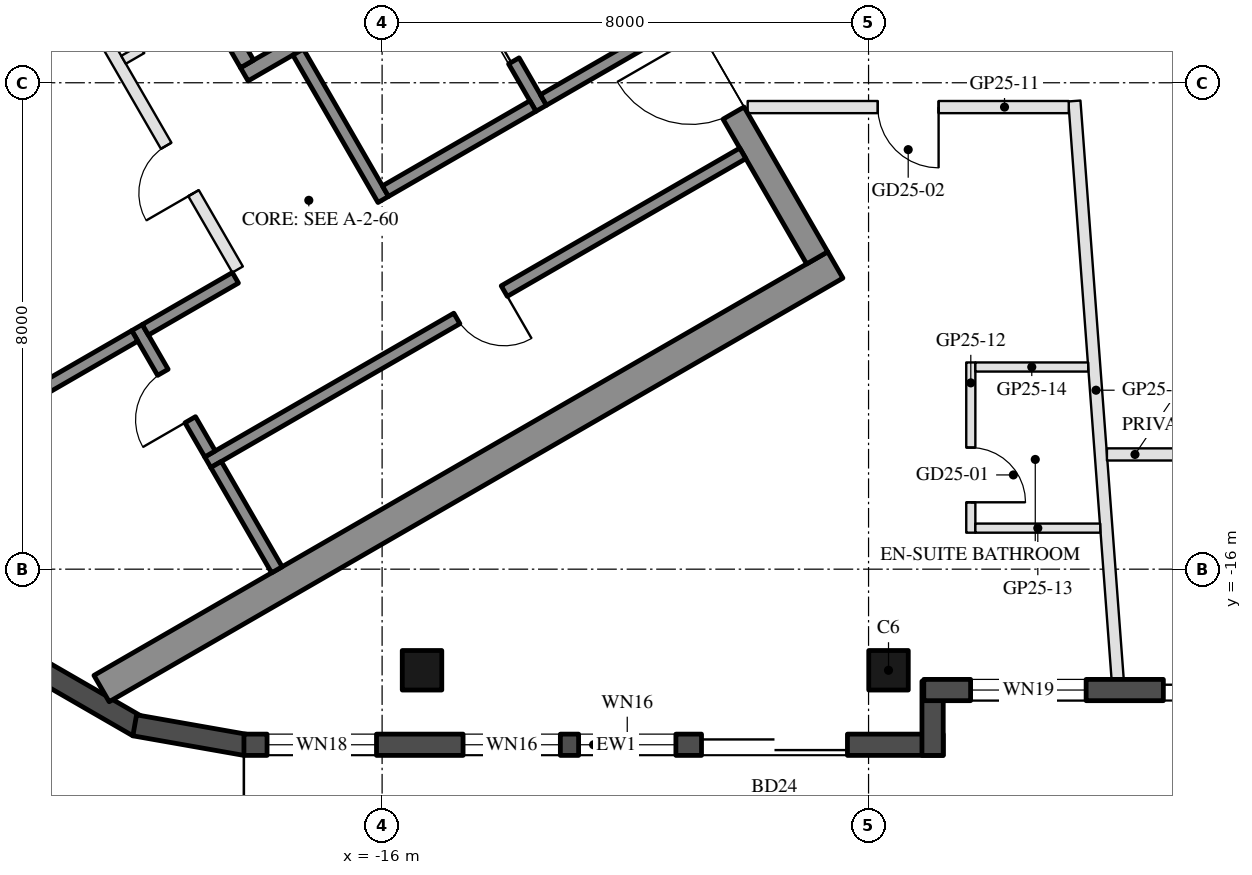
"""IFC4 building model, lengths in metres.
Left out: names, types, materials, properties, quantities, classifications, styles, units other than length and angle.
Written with IfcOpenShell. Run it as: python <this file> out.ifc"""

import sys

from ifc_helpers import new_model, si_unit, direction, frame, frame_2d, origin, origin_2d, place, context, subcontext, project, spatial, rectangle, hollow_rectangle, extrude, boolean, halfspace, element, fill, save


model = new_model("IFC4")
c1 = context("Model", 3, precision=1e-05, world=origin(), true_north=direction((0.0, 1.0)))
c2 = subcontext(c1, "Body", "Model", "MODEL_VIEW")
j1 = project(units=[si_unit("LENGTHUNIT", "METRE"), si_unit("PLANEANGLEUNIT", "RADIAN")], contexts=[c1])
p1 = place(None, origin())
s1 = spatial("IfcSite", under=j1, at=p1, CompositionType="ELEMENT")
p2 = place(p1, origin())
s2 = spatial("IfcBuilding", under=s1, at=p2, CompositionType="ELEMENT")
p3 = place(p2, frame((0.0, 0.0, 257.8)))
s3 = spatial("IfcBuildingStorey", under=s2, at=p3, CompositionType="ELEMENT", Elevation=257.8)
p4 = place(p3, frame((-15.344, -17.663, 0.0), z_axis=(0.0, 0.0, 1.0), x_axis=(-1.0, 0.0, 0.0)))
e1 = element("IfcColumn", 1, at=p4, inside=s3, PredefinedType="COLUMN", context=c2, shape_type="SweptSolid", body=[
    boolean("DIFFERENCE", extrude(hollow_rectangle(XDim=0.65, YDim=0.65, WallThickness=0.03, at=origin_2d()), origin(), (0.0, 0.0, 1.0), 3.7), halfspace(frame((0.0, 0.0, 0.047), z_axis=(0.0, 0.0, 1.0), x_axis=(1.0, 0.0, 0.0)), True)),
])
p5 = place(p3, frame((-7.672, -17.663, 0.0), z_axis=(0.0, 0.0, 1.0), x_axis=(-1.0, 0.0, 0.0)))
e2 = element("IfcColumn", 2, at=p5, inside=s3, PredefinedType="COLUMN", context=c2, shape_type="SweptSolid", body=[
    boolean("DIFFERENCE", extrude(hollow_rectangle(XDim=0.65, YDim=0.65, WallThickness=0.03, at=origin_2d()), origin(), (0.0, 0.0, 1.0), 3.7), halfspace(frame((0.0, 0.0, 0.04), z_axis=(0.0, 0.0, 1.0), x_axis=(1.0, 0.0, 0.0)), True)),
])
p6 = place(p3, frame((-21.618, -17.662, 0.0), z_axis=(0.0, 0.0, 1.0), x_axis=(0.866080385203, -0.499904757295, 0.0)))
e3 = element("IfcWall", 3, at=p6, inside=s3, PredefinedType="SOLIDWALL", context=c2, shape_type="SweptSolid", body=[
    extrude(rectangle(XDim=1.855, YDim=0.35, at=frame_2d((0.927, 0.0))), origin(), (0.0, 0.0, 1.0), 3.55),
])
p7 = place(p3, frame((-20.069, -18.568, 0.0), z_axis=(0.0, 0.0, 1.0), x_axis=(0.984791508075, -0.173740282098, 0.0)))
e4 = element("IfcWall", 4, at=p7, inside=s3, PredefinedType="SOLIDWALL", context=c2, shape_type="SweptSolid", body=[
    extrude(rectangle(XDim=1.855, YDim=0.35, at=frame_2d((0.927, 0.0))), origin(), (0.0, 0.0, 1.0), 3.55),
])
p8 = place(p3, frame((-18.272, -18.888, 0.0), z_axis=(0.0, 0.0, 1.0), x_axis=(1.0, 0.0, 0.0)))
e5 = element("IfcWall", 5, at=p8, inside=s3, PredefinedType="SOLIDWALL", context=c2, shape_type="SweptSolid", body=[
    extrude(rectangle(XDim=11.5, YDim=0.35, at=frame_2d((5.75, 0.0))), origin(), (0.0, 0.0, 1.0), 3.55),
])
p9 = place(p8, frame((0.38, 0.0, 0.3)))
e6 = element("IfcOpeningElement", 6, at=p9, cuts=e5, PredefinedType="OPENING", context=c2, shape_type="SweptSolid", body=[
    extrude(rectangle(XDim=1.8, YDim=2.65, at=frame_2d((0.9, 1.325))), frame((0.0, 0.185, 0.0), z_axis=(0.0, -1.0, 0.0), x_axis=(1.0, 0.0, 0.0)), (0.0, 0.0, 1.0), 0.37),
])
p10 = place(p8, frame((7.525, 0.0, 0.0)))
e7 = element("IfcOpeningElement", 7, at=p10, cuts=e5, PredefinedType="OPENING", context=c2, shape_type="SweptSolid", body=[
    extrude(rectangle(XDim=2.4, YDim=2.4, at=frame_2d((1.2, 1.2))), frame((0.0, 0.185, 0.0), z_axis=(0.0, -1.0, 0.0), x_axis=(1.0, 0.0, 0.0)), (0.0, 0.0, 1.0), 0.37),
])
p11 = place(p8, frame((3.604, 0.0, 0.3)))
e8 = element("IfcOpeningElement", 8, at=p11, cuts=e5, PredefinedType="OPENING", context=c2, shape_type="SweptSolid", body=[
    extrude(rectangle(XDim=1.6, YDim=2.65, at=frame_2d((0.8, 1.325))), frame((0.0, 0.185, 0.0), z_axis=(0.0, -1.0, 0.0), x_axis=(1.0, 0.0, 0.0)), (0.0, 0.0, 1.0), 0.37),
])
p12 = place(p8, frame((5.504, 0.0, 0.3)))
e9 = element("IfcOpeningElement", 9, at=p12, cuts=e5, PredefinedType="OPENING", context=c2, shape_type="SweptSolid", body=[
    extrude(rectangle(XDim=1.6, YDim=2.65, at=frame_2d((0.8, 1.325))), frame((0.0, 0.185, 0.0), z_axis=(0.0, -1.0, 0.0), x_axis=(1.0, 0.0, 0.0)), (0.0, 0.0, 1.0), 0.37),
])
p13 = place(p3, frame((-6.947, -19.063, 0.0), z_axis=(0.0, 0.0, 1.0), x_axis=(0.0, 1.0, 0.0)))
e10 = element("IfcWall", 10, at=p13, inside=s3, PredefinedType="SOLIDWALL", context=c2, shape_type="SweptSolid", body=[
    extrude(rectangle(XDim=1.22, YDim=0.35, at=frame_2d((0.61, 0.0))), origin(), (0.0, 0.0, 1.0), 3.55),
])
p14 = place(p3, frame((-7.092, -17.988, 0.0), z_axis=(0.0, 0.0, 1.0), x_axis=(1.0, 0.0, 0.0)))
e11 = element("IfcWall", 11, at=p14, inside=s3, PredefinedType="SOLIDWALL", context=c2, shape_type="SweptSolid", body=[
    extrude(rectangle(XDim=6.512, YDim=0.35, at=frame_2d((3.256, 0.0))), origin(), (0.0, 0.0, 1.0), 3.55),
])
p15 = place(p14, frame((0.77, 0.0, 0.3)))
e12 = element("IfcOpeningElement", 12, at=p15, cuts=e11, PredefinedType="OPENING", context=c2, shape_type="SweptSolid", body=[
    extrude(rectangle(XDim=1.9, YDim=2.65, at=frame_2d((0.95, 1.325))), frame((0.0, 0.185, 0.0), z_axis=(0.0, -1.0, 0.0), x_axis=(1.0, 0.0, 0.0)), (0.0, 0.0, 1.0), 0.37),
])
p16 = place(p14, frame((3.94, 0.0, 0.0)))
e13 = element("IfcOpeningElement", 13, at=p16, cuts=e11, PredefinedType="OPENING", context=c2, shape_type="SweptSolid", body=[
    extrude(rectangle(XDim=1.5, YDim=2.4, at=frame_2d((0.75, 1.2))), frame((0.0, 0.185, 0.0), z_axis=(0.0, -1.0, 0.0), x_axis=(1.0, 0.0, 0.0)), (0.0, 0.0, 1.0), 0.37),
])
for number, where, z_axis, x_axis in (
    (14, (-13.797, -1.903, 0.0), (0.0, 0.0, 1.0), (-0.866, -0.5, 0.0)),
    (15, (-8.547, -10.997, 0.0), (0.0, 0.0, 1.0), (-0.866, -0.5, 0.0)),
):
    element("IfcWall", number, at=place(p3, frame(where, z_axis=z_axis, x_axis=x_axis)), inside=s3, PredefinedType="SHEAR", context=c2, shape_type="SweptSolid", body=[
        extrude(rectangle(XDim=13.934, YDim=0.5, at=frame_2d((6.967, 0.0))), origin(), (0.0, 0.0, 1.0), 3.5),
    ])
p17 = place(p3, frame((-13.845, -2.22, 0.0), z_axis=(0.0, 0.0, 1.0), x_axis=(0.500004234368, -0.866022959057, 0.0)))
e16 = element("IfcWall", 16, at=p17, inside=s3, PredefinedType="SHEAR", context=c2, shape_type="SweptSolid", body=[
    extrude(rectangle(XDim=10.0, YDim=0.4, at=frame_2d((5.0, 0.0))), origin(), (0.0, 0.0, 1.0), 3.5),
])
p18 = place(p17, frame((3.55, 0.0, 0.0)))
e17 = element("IfcOpeningElement", 17, at=p18, cuts=e16, PredefinedType="OPENING", context=c2, shape_type="SweptSolid", body=[
    extrude(rectangle(XDim=1.1, YDim=2.1, at=frame_2d((0.55, 1.05))), frame((0.0, 0.21, 0.0), z_axis=(0.0, -1.0, 0.0), x_axis=(1.0, 0.0, 0.0)), (0.0, 0.0, 1.0), 0.42),
])
p19 = place(p17, frame((5.85, 0.0, 0.0)))
e18 = element("IfcOpeningElement", 18, at=p19, cuts=e16, PredefinedType="OPENING", context=c2, shape_type="SweptSolid", body=[
    extrude(rectangle(XDim=1.4, YDim=2.1, at=frame_2d((0.7, 1.05))), frame((0.0, 0.21, 0.0), z_axis=(0.0, -1.0, 0.0), x_axis=(1.0, 0.0, 0.0)), (0.0, 0.0, 1.0), 0.42),
])
p20 = place(p3, frame((-12.681, -4.636, 0.0), z_axis=(0.0, 0.0, 1.0), x_axis=(-0.866021702275, -0.500006411147, 0.0)))
e19 = element("IfcWall", 19, at=p20, inside=s3, PredefinedType="SHEAR", context=c2, shape_type="SweptSolid", body=[
    extrude(rectangle(XDim=6.45, YDim=0.25, at=frame_2d((3.225, 0.0))), origin(), (0.0, 0.0, 1.0), 3.5),
])
p21 = place(p20, frame((0.3, 0.0, 0.0)))
e20 = element("IfcOpeningElement", 20, at=p21, cuts=e19, PredefinedType="OPENING", context=c2, shape_type="SweptSolid", body=[
    extrude(rectangle(XDim=1.0, YDim=2.1, at=frame_2d((0.5, 1.05))), frame((0.0, 0.135, 0.0), z_axis=(0.0, -1.0, 0.0), x_axis=(1.0, 0.0, 0.0)), (0.0, 0.0, 1.0), 0.27),
])
p22 = place(p3, frame((-19.496, -5.482, 0.0), z_axis=(0.0, 0.0, 1.0), x_axis=(0.499990435942, -0.866030925526, 0.0)))
e21 = element("IfcWall", 21, at=p22, inside=s3, PredefinedType="SHEAR", context=c2, shape_type="SweptSolid", body=[
    extrude(rectangle(XDim=2.55, YDim=0.25, at=frame_2d((1.275, 0.0))), origin(), (0.0, 0.0, 1.0), 3.5),
])
p23 = place(p3, frame((-17.381, -7.495, 0.0), z_axis=(0.0, 0.0, 1.0), x_axis=(0.500011755427, -0.866018616679, 0.0)))
e22 = element("IfcWall", 22, at=p23, inside=s3, PredefinedType="SHEAR", context=c2, shape_type="SweptSolid", body=[
    extrude(rectangle(XDim=2.8, YDim=0.2, at=frame_2d((1.4, 0.0))), origin(), (0.0, 0.0, 1.0), 3.5),
])
p24 = place(p3, frame((-14.783, -5.995, 0.0), z_axis=(0.0, 0.0, 1.0), x_axis=(0.49994636267, -0.866056369097, 0.0)))
e23 = element("IfcWall", 23, at=p24, inside=s3, PredefinedType="SHEAR", context=c2, shape_type="SweptSolid", body=[
    extrude(rectangle(XDim=2.8, YDim=0.2, at=frame_2d((1.4, 0.0))), origin(), (0.0, 0.0, 1.0), 3.5),
])
p25 = place(p24, frame((0.7, 0.0, 0.0)))
e24 = element("IfcOpeningElement", 24, at=p25, cuts=e23, PredefinedType="OPENING", context=c2, shape_type="SweptSolid", body=[
    extrude(rectangle(XDim=1.2, YDim=2.1, at=frame_2d((0.6, 1.05))), frame((0.0, 0.11, 0.0), z_axis=(0.0, -1.0, 0.0), x_axis=(1.0, 0.0, 0.0)), (0.0, 0.0, 1.0), 0.22),
])
p26 = place(p3, frame((-13.52, -8.383, 0.0), z_axis=(0.0, 0.0, 1.0), x_axis=(-0.866034573852, -0.49998411664, 0.0)))
e25 = element("IfcWall", 25, at=p26, inside=s3, PredefinedType="SHEAR", context=c2, shape_type="SweptSolid", body=[
    extrude(rectangle(XDim=2.8, YDim=0.2, at=frame_2d((1.4, 0.0))), origin(), (0.0, 0.0, 1.0), 3.5),
])
p27 = place(p3, frame((-11.268, -7.083, 0.0), z_axis=(0.0, 0.0, 1.0), x_axis=(-0.866050077142, -0.499957262057, 0.0)))
e26 = element("IfcWall", 26, at=p27, inside=s3, PredefinedType="SHEAR", context=c2, shape_type="SweptSolid", body=[
    extrude(rectangle(XDim=2.4, YDim=0.2, at=frame_2d((1.2, 0.0))), origin(), (0.0, 0.0, 1.0), 3.5),
])
p28 = place(p3, frame((-10.068, -9.162, 0.0), z_axis=(0.0, 0.0, 1.0), x_axis=(-0.866032725843, -0.499987317609, 0.0)))
e27 = element("IfcWall", 27, at=p28, inside=s3, PredefinedType="SHEAR", context=c2, shape_type="SweptSolid", body=[
    extrude(rectangle(XDim=10.16, YDim=0.2, at=frame_2d((5.08, 0.0))), origin(), (0.0, 0.0, 1.0), 3.5),
])
p29 = place(p28, frame((4.53, 0.0, 0.0)))
e28 = element("IfcOpeningElement", 28, at=p29, cuts=e27, PredefinedType="OPENING", context=c2, shape_type="SweptSolid", body=[
    extrude(rectangle(XDim=0.9, YDim=2.1, at=frame_2d((0.45, 1.05))), frame((0.0, 0.11, 0.0), z_axis=(0.0, -1.0, 0.0), x_axis=(1.0, 0.0, 0.0)), (0.0, 0.0, 1.0), 0.22),
])
p30 = place(p3, frame((-20.031, -12.026, 0.0), z_axis=(0.0, 0.0, 1.0), x_axis=(0.500033551112, -0.866006032174, 0.0)))
e29 = element("IfcWall", 29, at=p30, inside=s3, PredefinedType="SHEAR", context=c2, shape_type="SweptSolid", body=[
    extrude(rectangle(XDim=2.4, YDim=0.2, at=frame_2d((1.2, 0.0))), origin(), (0.0, 0.0, 1.0), 3.5),
])
p31 = place(p30, frame((0.85, 0.0, 0.0)))
e30 = element("IfcOpeningElement", 30, at=p31, cuts=e29, PredefinedType="OPENING", context=c2, shape_type="SweptSolid", body=[
    extrude(rectangle(XDim=0.9, YDim=2.1, at=frame_2d((0.45, 1.05))), frame((0.0, 0.11, 0.0), z_axis=(0.0, -1.0, 0.0), x_axis=(1.0, 0.0, 0.0)), (0.0, 0.0, 1.0), 0.22),
])
p32 = place(p3, frame((-18.413, -11.208, 0.0), z_axis=(0.0, 0.0, 1.0), x_axis=(-0.866038183914, -0.499977863513, 0.0)))
e31 = element("IfcWall", 31, at=p32, inside=s3, PredefinedType="SHEAR", context=c2, shape_type="SweptSolid", body=[
    extrude(rectangle(XDim=1.71, YDim=0.2, at=frame_2d((0.855, 0.0))), origin(), (0.0, 0.0, 1.0), 3.5),
])
p33 = place(p3, frame((-18.73, -14.278, 0.0), z_axis=(0.0, 0.0, 1.0), x_axis=(0.50002537861, -0.866010750942, 0.0)))
e32 = element("IfcWall", 32, at=p33, inside=s3, PredefinedType="SHEAR", context=c2, shape_type="SweptSolid", body=[
    extrude(rectangle(XDim=2.0, YDim=0.2, at=frame_2d((1.0, 0.0))), origin(), (0.0, 0.0, 1.0), 3.5),
])
p34 = place(p3, frame((-20.067, -12.163, 0.0), z_axis=(0.0, 0.0, 1.0), x_axis=(-0.866079196458, -0.49990681678, 0.0)))
e33 = element("IfcWall", 33, at=p34, inside=s3, PredefinedType="SHEAR", context=c2, shape_type="SweptSolid", body=[
    extrude(rectangle(XDim=2.216, YDim=0.2, at=frame_2d((1.108, 0.0))), origin(), (0.0, 0.0, 1.0), 3.5),
])
p35 = place(p3, frame((-21.076, -6.395, 0.0), z_axis=(0.0, 0.0, 1.0), x_axis=(0.50001468107, -0.866016927499, 0.0)))
e34 = element("IfcWall", 34, at=p35, inside=s3, PredefinedType="PARTITIONING", context=c2, shape_type="SweptSolid", body=[
    extrude(rectangle(XDim=5.4, YDim=0.2, at=frame_2d((2.7, 0.0))), origin(), (0.0, 0.0, 1.0), 3.5),
])
p36 = place(p35, frame((3.05, 0.0, 0.0)))
e35 = element("IfcOpeningElement", 35, at=p36, cuts=e34, PredefinedType="OPENING", context=c2, shape_type="SweptSolid", body=[
    extrude(rectangle(XDim=0.9, YDim=2.1, at=frame_2d((0.45, 1.05))), frame((0.0, 0.11, 0.0), z_axis=(0.0, -1.0, 0.0), x_axis=(1.0, 0.0, 0.0)), (0.0, 0.0, 1.0), 0.22),
])
p37 = place(p3, frame((-18.866, -6.822, 0.0), z_axis=(0.0, 0.0, 1.0), x_axis=(-0.866028054938, -0.499995408039, 0.0)))
e36 = element("IfcWall", 36, at=p37, inside=s3, PredefinedType="PARTITIONING", context=c2, shape_type="SweptSolid", body=[
    extrude(rectangle(XDim=1.6, YDim=0.15, at=frame_2d((0.8, 0.0))), origin(), (0.0, 0.0, 1.0), 3.5),
])
p38 = place(p37, frame((0.35, 0.0, 0.0)))
e37 = element("IfcOpeningElement", 37, at=p38, cuts=e36, PredefinedType="OPENING", context=c2, shape_type="SweptSolid", body=[
    extrude(rectangle(XDim=0.9, YDim=2.1, at=frame_2d((0.45, 1.05))), frame((0.0, 0.085, 0.0), z_axis=(0.0, -1.0, 0.0), x_axis=(1.0, 0.0, 0.0)), (0.0, 0.0, 1.0), 0.17),
])
p39 = place(p3, frame((-3.903, -17.813, 0.0), z_axis=(0.0, 0.0, 1.0), x_axis=(-0.074602257677, 0.997213368918, 0.0)))
e38 = element("IfcWall", 38, at=p39, inside=s3, PredefinedType="PARTITIONING", context=c2, shape_type="SweptSolid", body=[
    extrude(rectangle(XDim=9.54, YDim=0.2, at=frame_2d((4.77, 0.0))), origin(), (0.0, 0.0, 1.0), 3.0),
])
p40 = place(p3, frame((-4.708, -8.4, 0.0), z_axis=(0.0, 0.0, 1.0), x_axis=(-1.0, 0.0, 0.0)))
e39 = element("IfcWall", 39, at=p40, inside=s3, PredefinedType="PARTITIONING", context=c2, shape_type="SweptSolid", body=[
    extrude(rectangle(XDim=5.281, YDim=0.2, at=frame_2d((2.64, 0.0))), origin(), (0.0, 0.0, 1.0), 3.0),
])
p41 = place(p40, frame((2.14, 0.0, 0.0)))
e40 = element("IfcOpeningElement", 40, at=p41, cuts=e39, PredefinedType="OPENING", context=c2, shape_type="SweptSolid", body=[
    extrude(rectangle(XDim=1.0, YDim=2.1, at=frame_2d((0.5, 1.05))), frame((0.0, 0.11, 0.0), z_axis=(0.0, -1.0, 0.0), x_axis=(1.0, 0.0, 0.0)), (0.0, 0.0, 1.0), 0.22),
])
p42 = place(p3, frame((-6.319, -12.6, 0.0), z_axis=(0.0, 0.0, 1.0), x_axis=(0.0, -1.0, 0.0)))
e41 = element("IfcWall", 41, at=p42, inside=s3, PredefinedType="PARTITIONING", context=c2, shape_type="SweptSolid", body=[
    extrude(rectangle(XDim=2.8, YDim=0.15, at=frame_2d((1.4, 0.0))), origin(), (0.0, 0.0, 1.0), 3.55),
])
p43 = place(p42, frame((1.4, 0.0, 0.0)))
e42 = element("IfcOpeningElement", 42, at=p43, cuts=e41, PredefinedType="OPENING", context=c2, shape_type="SweptSolid", body=[
    extrude(rectangle(XDim=0.9, YDim=2.1, at=frame_2d((0.45, 1.05))), frame((0.0, 0.085, 0.0), z_axis=(0.0, -1.0, 0.0), x_axis=(1.0, 0.0, 0.0)), (0.0, 0.0, 1.0), 0.17),
])
p44 = place(p3, frame((-6.243, -15.325, 0.0), z_axis=(0.0, 0.0, 1.0), x_axis=(1.0, 0.0, 0.0)))
e43 = element("IfcWall", 43, at=p44, inside=s3, PredefinedType="PARTITIONING", context=c2, shape_type="SweptSolid", body=[
    extrude(rectangle(XDim=2.054, YDim=0.15, at=frame_2d((1.027, 0.0))), origin(), (0.0, 0.0, 1.0), 3.55),
])
p45 = place(p3, frame((-6.243, -12.675, 0.0), z_axis=(0.0, 0.0, 1.0), x_axis=(1.0, 0.0, 0.0)))
e44 = element("IfcWall", 44, at=p45, inside=s3, PredefinedType="PARTITIONING", context=c2, shape_type="SweptSolid", body=[
    extrude(rectangle(XDim=1.855, YDim=0.15, at=frame_2d((0.928, 0.0))), origin(), (0.0, 0.0, 1.0), 3.55),
])
p46 = place(p3, frame((-0.235, -14.113, 0.0), z_axis=(0.0, 0.0, 1.0), x_axis=(-1.0, 0.0, 0.0)))
e45 = element("IfcWall", 45, at=p46, inside=s3, PredefinedType="PARTITIONING", context=c2, shape_type="SweptSolid", body=[
    extrude(rectangle(XDim=3.845, YDim=0.2, at=frame_2d((1.922, 0.0))), origin(), (0.0, 0.0, 1.0), 3.0),
])
p47 = place(p46, frame((1.422, 0.0, 0.0)))
e46 = element("IfcOpeningElement", 46, at=p47, cuts=e45, PredefinedType="OPENING", context=c2, shape_type="SweptSolid", body=[
    extrude(rectangle(XDim=1.0, YDim=2.1, at=frame_2d((0.5, 1.05))), frame((0.0, 0.11, 0.0), z_axis=(0.0, -1.0, 0.0), x_axis=(1.0, 0.0, 0.0)), (0.0, 0.0, 1.0), 0.22),
])
p48 = place(p9, origin())
e47 = element("IfcWindow", 47, at=p48, inside=s3, PartitioningType="SINGLE_PANEL", PredefinedType="WINDOW", context=c2, shape_type="SweptSolid", body=[
    extrude(rectangle(XDim=1.8, YDim=2.65, at=frame_2d((0.9, 1.325))), frame((0.0, 0.03, 0.0), z_axis=(0.0, -1.0, 0.0), x_axis=(1.0, 0.0, 0.0)), (0.0, 0.0, 1.0), 0.06),
])
fill(e6, e47)
p49 = place(p10, frame((2.4, 0.0, 0.0), z_axis=(0.0, 0.0, 1.0), x_axis=(-1.0, 0.0, 0.0)))
e48 = element("IfcDoor", 48, at=p49, inside=s3, OperationType="SLIDING_TO_LEFT", PredefinedType="DOOR", context=c2, shape_type="SweptSolid", body=[
    extrude(rectangle(XDim=2.4, YDim=2.4, at=frame_2d((1.2, 1.2))), frame((0.0, 0.025, 0.0), z_axis=(0.0, -1.0, 0.0), x_axis=(1.0, 0.0, 0.0)), (0.0, 0.0, 1.0), 0.05),
])
fill(e7, e48)
p50 = place(p11, origin())
e49 = element("IfcWindow", 49, at=p50, inside=s3, PartitioningType="SINGLE_PANEL", PredefinedType="WINDOW", context=c2, shape_type="SweptSolid", body=[
    extrude(rectangle(XDim=1.6, YDim=2.65, at=frame_2d((0.8, 1.325))), frame((0.0, 0.03, 0.0), z_axis=(0.0, -1.0, 0.0), x_axis=(1.0, 0.0, 0.0)), (0.0, 0.0, 1.0), 0.06),
])
fill(e8, e49)
p51 = place(p12, origin())
e50 = element("IfcWindow", 50, at=p51, inside=s3, PartitioningType="SINGLE_PANEL", PredefinedType="WINDOW", context=c2, shape_type="SweptSolid", body=[
    extrude(rectangle(XDim=1.6, YDim=2.65, at=frame_2d((0.8, 1.325))), frame((0.0, 0.03, 0.0), z_axis=(0.0, -1.0, 0.0), x_axis=(1.0, 0.0, 0.0)), (0.0, 0.0, 1.0), 0.06),
])
fill(e9, e50)
p52 = place(p15, origin())
e51 = element("IfcWindow", 51, at=p52, inside=s3, PartitioningType="SINGLE_PANEL", PredefinedType="WINDOW", context=c2, shape_type="SweptSolid", body=[
    extrude(rectangle(XDim=1.9, YDim=2.65, at=frame_2d((0.95, 1.325))), frame((0.0, 0.03, 0.0), z_axis=(0.0, -1.0, 0.0), x_axis=(1.0, 0.0, 0.0)), (0.0, 0.0, 1.0), 0.06),
])
fill(e12, e51)
p53 = place(p16, frame((1.5, 0.0, 0.0), z_axis=(0.0, 0.0, 1.0), x_axis=(-1.0, 0.0, 0.0)))
e52 = element("IfcDoor", 52, at=p53, inside=s3, OperationType="SLIDING_TO_LEFT", PredefinedType="DOOR", context=c2, shape_type="SweptSolid", body=[
    extrude(rectangle(XDim=1.5, YDim=2.4, at=frame_2d((0.75, 1.2))), frame((0.0, 0.025, 0.0), z_axis=(0.0, -1.0, 0.0), x_axis=(1.0, 0.0, 0.0)), (0.0, 0.0, 1.0), 0.05),
])
fill(e13, e52)
p54 = place(p25, origin())
e53 = element("IfcDoor", 53, at=p54, inside=s3, OperationType="DOUBLE_DOOR_SLIDING", PredefinedType="DOOR", context=c2, shape_type="SweptSolid", body=[
    extrude(rectangle(XDim=1.2, YDim=2.1, at=frame_2d((0.6, 1.05))), frame((0.0, 0.025, 0.0), z_axis=(0.0, -1.0, 0.0), x_axis=(1.0, 0.0, 0.0)), (0.0, 0.0, 1.0), 0.05),
])
fill(e24, e53)
p55 = place(p29, origin())
e54 = element("IfcDoor", 54, at=p55, inside=s3, OperationType="SINGLE_SWING_LEFT", PredefinedType="DOOR", context=c2, shape_type="SweptSolid", body=[
    extrude(rectangle(XDim=0.9, YDim=2.1, at=frame_2d((0.45, 1.05))), frame((0.0, 0.025, 0.0), z_axis=(0.0, -1.0, 0.0), x_axis=(1.0, 0.0, 0.0)), (0.0, 0.0, 1.0), 0.05),
])
fill(e28, e54)
p56 = place(p31, frame((0.9, 0.0, 0.0), z_axis=(0.0, 0.0, 1.0), x_axis=(-1.0, 0.0, 0.0)))
e55 = element("IfcDoor", 55, at=p56, inside=s3, OperationType="SINGLE_SWING_LEFT", PredefinedType="DOOR", context=c2, shape_type="SweptSolid", body=[
    extrude(rectangle(XDim=0.9, YDim=2.1, at=frame_2d((0.45, 1.05))), frame((0.0, 0.025, 0.0), z_axis=(0.0, -1.0, 0.0), x_axis=(1.0, 0.0, 0.0)), (0.0, 0.0, 1.0), 0.05),
])
fill(e30, e55)
p57 = place(p36, frame((0.9, 0.0, 0.0), z_axis=(0.0, 0.0, 1.0), x_axis=(-1.0, 0.0, 0.0)))
e56 = element("IfcDoor", 56, at=p57, inside=s3, OperationType="SINGLE_SWING_LEFT", PredefinedType="DOOR", context=c2, shape_type="SweptSolid", body=[
    extrude(rectangle(XDim=0.9, YDim=2.1, at=frame_2d((0.45, 1.05))), frame((0.0, 0.025, 0.0), z_axis=(0.0, -1.0, 0.0), x_axis=(1.0, 0.0, 0.0)), (0.0, 0.0, 1.0), 0.05),
])
fill(e35, e56)
p58 = place(p19, frame((1.4, 0.0, 0.0), z_axis=(0.0, 0.0, 1.0), x_axis=(-1.0, 0.0, 0.0)))
e57 = element("IfcDoor", 57, at=p58, inside=s3, OperationType="DOUBLE_DOOR_SINGLE_SWING", PredefinedType="DOOR", context=c2, shape_type="SweptSolid", body=[
    extrude(rectangle(XDim=1.4, YDim=2.1, at=frame_2d((0.7, 1.05))), frame((0.0, 0.025, 0.0), z_axis=(0.0, -1.0, 0.0), x_axis=(1.0, 0.0, 0.0)), (0.0, 0.0, 1.0), 0.05),
])
fill(e18, e57)
p59 = place(p43, origin())
e58 = element("IfcDoor", 58, at=p59, inside=s3, OperationType="SINGLE_SWING_RIGHT", PredefinedType="DOOR", context=c2, shape_type="SweptSolid", body=[
    extrude(rectangle(XDim=0.9, YDim=2.1, at=frame_2d((0.45, 1.05))), frame((0.0, 0.025, 0.0), z_axis=(0.0, -1.0, 0.0), x_axis=(1.0, 0.0, 0.0)), (0.0, 0.0, 1.0), 0.05),
])
fill(e42, e58)
p60 = place(p41, origin())
e59 = element("IfcDoor", 59, at=p60, inside=s3, OperationType="SINGLE_SWING_LEFT", PredefinedType="DOOR", context=c2, shape_type="SweptSolid", body=[
    extrude(rectangle(XDim=1.0, YDim=2.1, at=frame_2d((0.5, 1.05))), frame((0.0, 0.025, 0.0), z_axis=(0.0, -1.0, 0.0), x_axis=(1.0, 0.0, 0.0)), (0.0, 0.0, 1.0), 0.05),
])
fill(e40, e59)
save(model, sys.argv[1])
